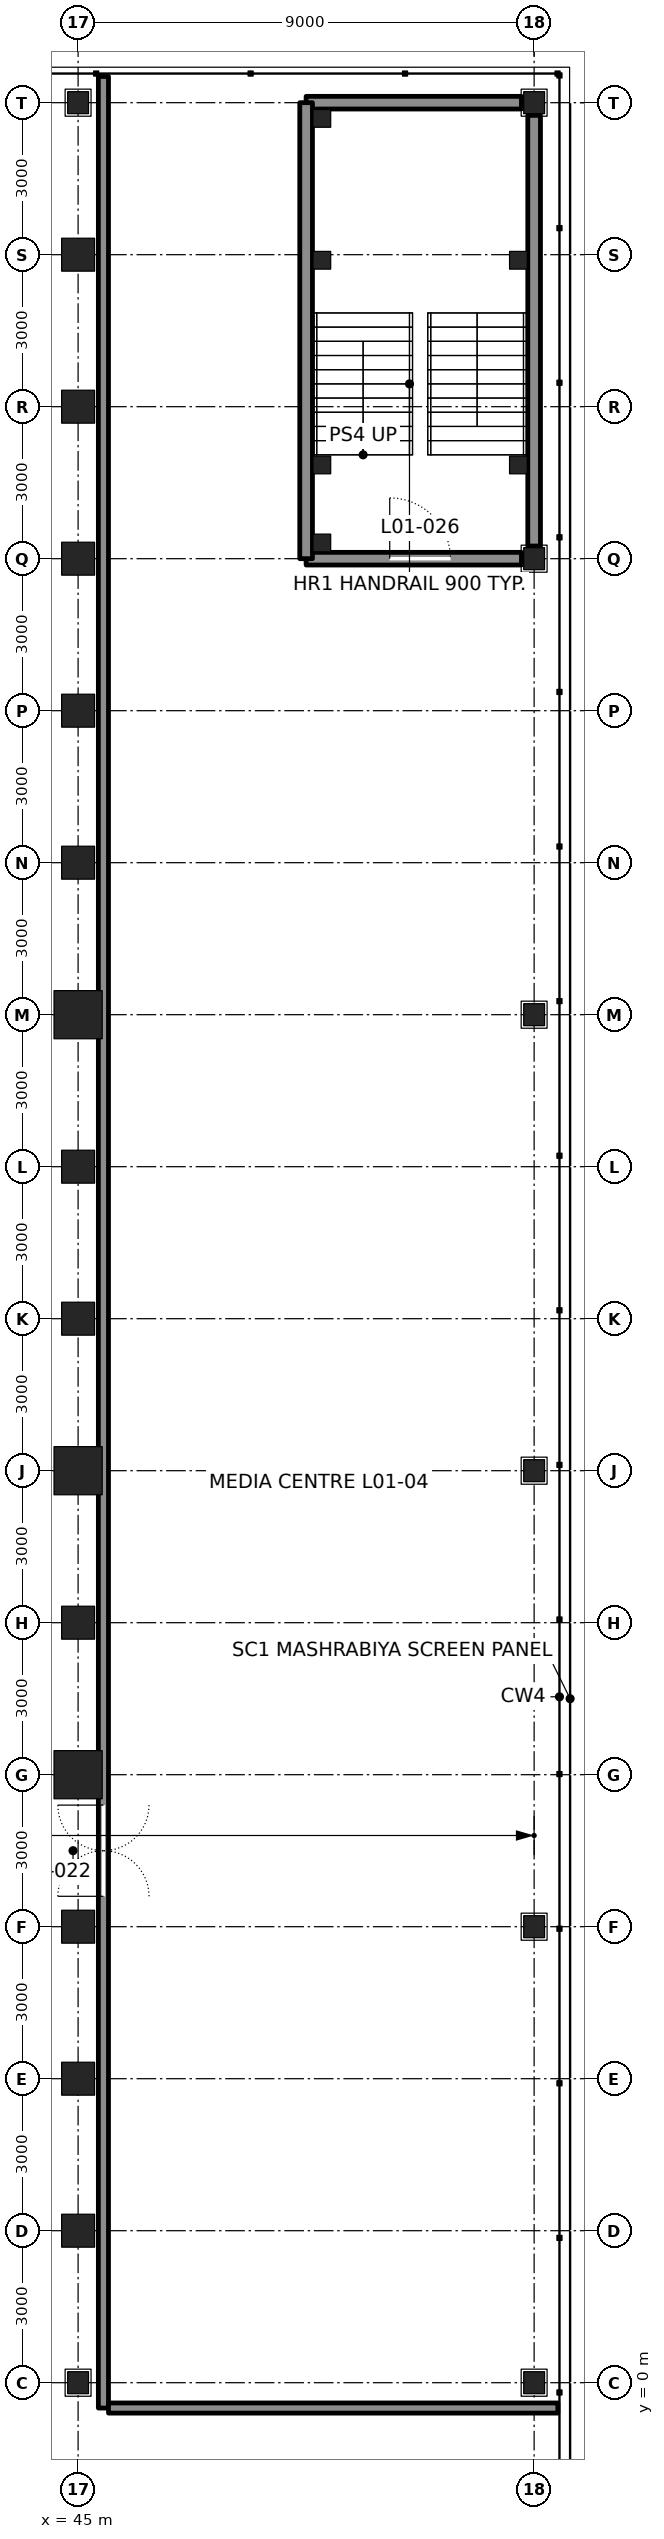
"""IFC4 building model, lengths in metres.
Left out: names, types, materials, properties, quantities, classifications, styles, units other than length and angle.
Written with IfcOpenShell. Run it as: python <this file> out.ifc"""

import sys

from ifc_helpers import new_model, si_unit, direction, frame, frame_2d, origin, origin_2d, place, context, subcontext, project, spatial, rectangle, hollow_rectangle, i_section, extrude, element, fill, save


model = new_model("IFC4")
c1 = context("Model", 3, precision=1e-05, world=origin(), true_north=direction((0.0, 1.0)))
c2 = subcontext(c1, "Body", "Model", "MODEL_VIEW")
j1 = project(units=[si_unit("LENGTHUNIT", "METRE"), si_unit("PLANEANGLEUNIT", "RADIAN")], contexts=[c1])
p1 = place(None, origin())
s1 = spatial("IfcSite", under=j1, at=p1, CompositionType="ELEMENT")
p2 = place(p1, origin())
s2 = spatial("IfcBuilding", under=s1, at=p2, CompositionType="ELEMENT")
p3 = place(p2, frame((0.0, 0.0, 6.0)))
s3 = spatial("IfcBuildingStorey", under=s2, at=p3, CompositionType="ELEMENT", Elevation=6.0)
for number, where, z_axis, x_axis in (
    (1, (45.0, 3.0, 0.0), (0.0, 0.0, 1.0), (1.0, 0.0, 0.0)),
    (2, (45.0, 6.0, 0.0), (0.0, 0.0, 1.0), (1.0, 0.0, 0.0)),
    (3, (45.0, 9.0, 0.0), (0.0, 0.0, 1.0), (1.0, 0.0, 0.0)),
):
    element("IfcColumn", number, at=place(p3, frame(where, z_axis=z_axis, x_axis=x_axis)), inside=s3, PredefinedType="COLUMN", context=c2, shape_type="SweptSolid", body=[
        extrude(hollow_rectangle(XDim=0.65, YDim=0.65, WallThickness=0.065, at=origin_2d()), origin(), (0.0, 0.0, 1.0), 7.5),
    ])
p4 = place(p3, frame((45.0, 12.0, 0.0), z_axis=(0.0, 0.0, 1.0), x_axis=(1.0, 0.0, 0.0)))
e4 = element("IfcColumn", 4, at=p4, inside=s3, PredefinedType="COLUMN", context=c2, shape_type="SweptSolid", body=[
    extrude(hollow_rectangle(XDim=0.95, YDim=0.95, WallThickness=0.11, at=origin_2d()), origin(), (0.0, 0.0, 1.0), 7.5),
])
p5 = place(p3, frame((45.0, 15.0, 0.0), z_axis=(0.0, 0.0, 1.0), x_axis=(1.0, 0.0, 0.0)))
e5 = element("IfcColumn", 5, at=p5, inside=s3, PredefinedType="COLUMN", context=c2, shape_type="SweptSolid", body=[
    extrude(hollow_rectangle(XDim=0.65, YDim=0.65, WallThickness=0.065, at=origin_2d()), origin(), (0.0, 0.0, 1.0), 7.5),
])
p6 = place(p3, frame((45.0, 18.0, 0.0), z_axis=(0.0, 0.0, 1.0), x_axis=(1.0, 0.0, 0.0)))
e6 = element("IfcColumn", 6, at=p6, inside=s3, PredefinedType="COLUMN", context=c2, shape_type="SweptSolid", body=[
    extrude(hollow_rectangle(XDim=0.95, YDim=0.95, WallThickness=0.11, at=origin_2d()), origin(), (0.0, 0.0, 1.0), 7.5),
])
for number, where, z_axis, x_axis in (
    (7, (45.0, 21.0, 0.0), (0.0, 0.0, 1.0), (1.0, 0.0, 0.0)),
    (8, (45.0, 24.0, 0.0), (0.0, 0.0, 1.0), (1.0, 0.0, 0.0)),
):
    element("IfcColumn", number, at=place(p3, frame(where, z_axis=z_axis, x_axis=x_axis)), inside=s3, PredefinedType="COLUMN", context=c2, shape_type="SweptSolid", body=[
        extrude(hollow_rectangle(XDim=0.65, YDim=0.65, WallThickness=0.065, at=origin_2d()), origin(), (0.0, 0.0, 1.0), 7.5),
    ])
p7 = place(p3, frame((45.0, 27.0, 0.0), z_axis=(0.0, 0.0, 1.0), x_axis=(1.0, 0.0, 0.0)))
e9 = element("IfcColumn", 9, at=p7, inside=s3, PredefinedType="COLUMN", context=c2, shape_type="SweptSolid", body=[
    extrude(hollow_rectangle(XDim=0.95, YDim=0.95, WallThickness=0.11, at=origin_2d()), origin(), (0.0, 0.0, 1.0), 7.5),
])
for number, where, z_axis, x_axis in (
    (10, (45.0, 30.0, 0.0), (0.0, 0.0, 1.0), (1.0, 0.0, 0.0)),
    (11, (45.0, 33.0, 0.0), (0.0, 0.0, 1.0), (1.0, 0.0, 0.0)),
    (12, (45.0, 36.0, 0.0), (0.0, 0.0, 1.0), (1.0, 0.0, 0.0)),
    (13, (45.0, 39.0, 0.0), (0.0, 0.0, 1.0), (1.0, 0.0, 0.0)),
    (14, (45.0, 42.0, 0.0), (0.0, 0.0, 1.0), (1.0, 0.0, 0.0)),
):
    element("IfcColumn", number, at=place(p3, frame(where, z_axis=z_axis, x_axis=x_axis)), inside=s3, PredefinedType="COLUMN", context=c2, shape_type="SweptSolid", body=[
        extrude(hollow_rectangle(XDim=0.65, YDim=0.65, WallThickness=0.065, at=origin_2d()), origin(), (0.0, 0.0, 1.0), 7.5),
    ])
for number, where, z_axis, x_axis in (
    (15, (45.0, 0.0, 0.0), (0.0, 0.0, 1.0), (1.0, 0.0, 0.0)),
    (16, (45.0, 45.0, 0.0), (0.0, 0.0, 1.0), (1.0, 0.0, 0.0)),
    (17, (54.0, 0.0, 0.0), (0.0, 0.0, 1.0), (1.0, 0.0, 0.0)),
    (18, (54.0, 9.0, 0.0), (0.0, 0.0, 1.0), (1.0, 0.0, 0.0)),
    (19, (54.0, 18.0, 0.0), (0.0, 0.0, 1.0), (1.0, 0.0, 0.0)),
    (20, (54.0, 27.0, 0.0), (0.0, 0.0, 1.0), (1.0, 0.0, 0.0)),
    (21, (54.0, 36.0, 0.0), (0.0, 0.0, 1.0), (1.0, 0.0, 0.0)),
    (22, (54.0, 45.0, 0.0), (0.0, 0.0, 1.0), (1.0, 0.0, 0.0)),
):
    element("IfcColumn", number, at=place(p3, frame(where, z_axis=z_axis, x_axis=x_axis)), inside=s3, PredefinedType="COLUMN", context=c2, shape_type="SweptSolid", body=[
        extrude(i_section(OverallWidth=0.411, OverallDepth=0.434, WebThickness=0.036, FlangeThickness=0.057, at=origin_2d()), origin(), (0.0, 0.0, 1.0), 7.5),
    ])
p8 = place(p3, frame((45.5, -0.5, 0.0), z_axis=(0.0, 0.0, 1.0), x_axis=(0.0, 1.0, 0.0)))
e23 = element("IfcWall", 23, at=p8, inside=s3, PredefinedType="PARTITIONING", context=c2, shape_type="SweptSolid", body=[
    extrude(rectangle(XDim=46.018, YDim=0.2, at=frame_2d((23.009, 0.0))), origin(), (0.0, 0.0, 1.0), 7.3),
])
p9 = place(p8, frame((10.1, 0.0, 0.0)))
e24 = element("IfcOpeningElement", 24, at=p9, cuts=e23, PredefinedType="OPENING", context=c2, shape_type="SweptSolid", body=[
    extrude(rectangle(XDim=1.8, YDim=2.4, at=frame_2d((0.9, 1.2))), frame((0.0, 0.11, 0.0), z_axis=(0.0, -1.0, 0.0), x_axis=(1.0, 0.0, 0.0)), (0.0, 0.0, 1.0), 0.22),
])
p10 = place(p3, frame((45.6, -0.5, 0.0), z_axis=(0.0, 0.0, 1.0), x_axis=(1.0, 0.0, 0.0)))
e25 = element("IfcWall", 25, at=p10, inside=s3, PredefinedType="PARTITIONING", context=c2, shape_type="SweptSolid", body=[
    extrude(rectangle(XDim=8.868, YDim=0.2, at=frame_2d((4.434, 0.0))), origin(), (0.0, 0.0, 1.0), 7.3),
])
p11 = place(p3, frame((49.5, 36.0, 0.0), z_axis=(0.0, 0.0, 1.0), x_axis=(1.0, 0.0, 0.0)))
e26 = element("IfcWall", 26, at=p11, inside=s3, PredefinedType="SOLIDWALL", context=c2, shape_type="SweptSolid", body=[
    extrude(rectangle(XDim=4.25, YDim=0.25, at=frame_2d((2.125, 0.0))), origin(), (0.0, 0.0, 1.0), 6.353),
])
p12 = place(p11, frame((1.65, 0.0, 0.0)))
e27 = element("IfcOpeningElement", 27, at=p12, cuts=e26, PredefinedType="OPENING", context=c2, shape_type="SweptSolid", body=[
    extrude(rectangle(XDim=1.2, YDim=2.1, at=frame_2d((0.6, 1.05))), frame((0.0, 0.135, 0.0), z_axis=(0.0, -1.0, 0.0), x_axis=(1.0, 0.0, 0.0)), (0.0, 0.0, 1.0), 0.27),
])
p13 = place(p3, frame((54.0, 36.25, 0.0), z_axis=(0.0, 0.0, 1.0), x_axis=(0.0, 1.0, 0.0)))
e28 = element("IfcWall", 28, at=p13, inside=s3, PredefinedType="SOLIDWALL", context=c2, shape_type="SweptSolid", body=[
    extrude(rectangle(XDim=8.5, YDim=0.25, at=frame_2d((4.25, 0.0))), origin(), (0.0, 0.0, 1.0), 6.353),
])
p14 = place(p3, frame((49.5, 45.0, 0.0), z_axis=(0.0, 0.0, 1.0), x_axis=(1.0, 0.0, 0.0)))
e29 = element("IfcWall", 29, at=p14, inside=s3, PredefinedType="SOLIDWALL", context=c2, shape_type="SweptSolid", body=[
    extrude(rectangle(XDim=4.25, YDim=0.25, at=frame_2d((2.125, 0.0))), origin(), (0.0, 0.0, 1.0), 6.353),
])
p15 = place(p3, frame((49.5, 36.0, 0.0), z_axis=(0.0, 0.0, 1.0), x_axis=(0.0, 1.0, 0.0)))
e30 = element("IfcWall", 30, at=p15, inside=s3, PredefinedType="SOLIDWALL", context=c2, shape_type="SweptSolid", body=[
    extrude(rectangle(XDim=9.0, YDim=0.25, at=frame_2d((4.5, 0.0))), origin(), (0.0, 0.0, 1.0), 6.353),
])
for number, where, z_axis, x_axis in (
    (31, (49.81, 44.69, 0.0), (0.0, 0.0, 1.0), (1.0, 0.0, 0.0)),
    (32, (49.81, 41.89, 0.0), (0.0, 0.0, 1.0), (1.0, 0.0, 0.0)),
    (33, (53.69, 41.89, 0.0), (0.0, 0.0, 1.0), (1.0, 0.0, 0.0)),
    (34, (49.81, 37.85, 0.0), (0.0, 0.0, 1.0), (1.0, 0.0, 0.0)),
    (35, (53.69, 37.85, 0.0), (0.0, 0.0, 1.0), (1.0, 0.0, 0.0)),
    (36, (49.81, 36.31, 0.0), (0.0, 0.0, 1.0), (1.0, 0.0, 0.0)),
):
    element("IfcColumn", number, at=place(p3, frame(where, z_axis=z_axis, x_axis=x_axis)), inside=s3, PredefinedType="COLUMN", context=c2, shape_type="SweptSolid", body=[
        extrude(hollow_rectangle(XDim=0.35, YDim=0.35, WallThickness=0.035, at=origin_2d()), origin(), (0.0, 0.0, 1.0), 7.5),
    ])
p16 = place(p9, origin())
e37 = element("IfcDoor", 37, at=p16, inside=s3, OperationType="DOUBLE_DOOR_DOUBLE_SWING", PredefinedType="DOOR", context=c2, shape_type="SweptSolid", body=[
    extrude(rectangle(XDim=1.8, YDim=2.4, at=frame_2d((0.9, 1.2))), frame((0.0, 0.025, 0.0), z_axis=(0.0, -1.0, 0.0), x_axis=(1.0, 0.0, 0.0)), (0.0, 0.0, 1.0), 0.05),
])
fill(e24, e37)
p17 = place(p12, origin())
e38 = element("IfcDoor", 38, at=p17, inside=s3, OperationType="SINGLE_SWING_LEFT", PredefinedType="DOOR", context=c2, shape_type="SweptSolid", body=[
    extrude(rectangle(XDim=1.2, YDim=2.1, at=frame_2d((0.6, 1.05))), frame((0.0, 0.025, 0.0), z_axis=(0.0, -1.0, 0.0), x_axis=(1.0, 0.0, 0.0)), (0.0, 0.0, 1.0), 0.05),
])
fill(e27, e38)
save(model, sys.argv[1])
